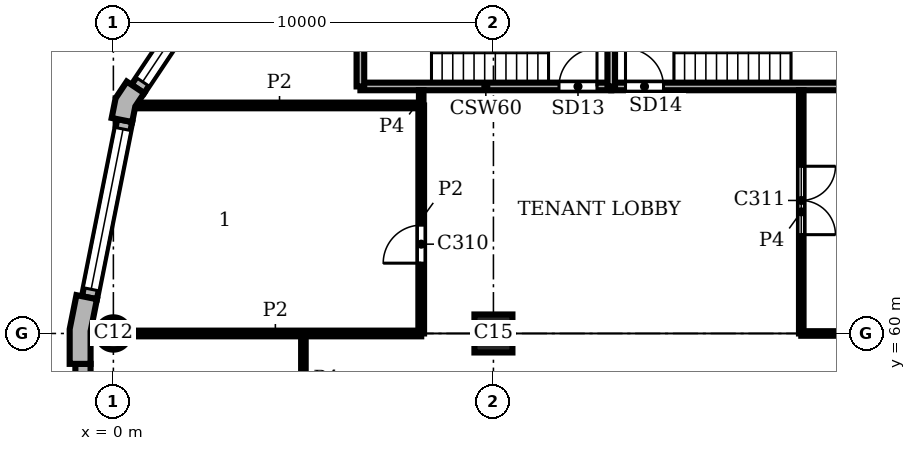
"""IFC4 building model, lengths in metres.
Left out: names, types, materials, properties, quantities, classifications, styles, units other than length and angle.
Written with IfcOpenShell. Run it as: python <this file> out.ifc"""

import sys

from ifc_helpers import new_model, si_unit, direction, frame, frame_2d, origin, origin_2d, place, context, subcontext, project, spatial, polyline, rectangle, circle, outline, extrude, element, fill, save


model = new_model("IFC4")
c1 = context("Model", 3, precision=1e-05, world=origin(), true_north=direction((0.0, 1.0)))
c2 = subcontext(c1, "Body", "Model", "MODEL_VIEW")
j1 = project(units=[si_unit("LENGTHUNIT", "METRE"), si_unit("PLANEANGLEUNIT", "RADIAN")], contexts=[c1])
p1 = place(None, origin())
s1 = spatial("IfcSite", under=j1, at=p1, CompositionType="ELEMENT")
p2 = place(p1, origin())
s2 = spatial("IfcBuilding", under=s1, at=p2, CompositionType="ELEMENT")
p3 = place(p2, frame((0.0, 0.0, 274.8)))
s3 = spatial("IfcBuildingStorey", under=s2, at=p3, CompositionType="ELEMENT", Elevation=274.8)
p4 = place(p3, frame((0.0, 60.0, 0.0), z_axis=(0.0, 0.0, 1.0), x_axis=(1.0, 0.0, 0.0)))
e1 = element("IfcColumn", 1, at=p4, inside=s3, PredefinedType="COLUMN", context=c2, shape_type="SweptSolid", body=[
    extrude(circle(Radius=0.425, at=origin_2d()), origin(), (0.0, 0.0, 1.0), 3.9),
])
p5 = place(p3, frame((10.0, 60.0, 0.0), z_axis=(0.0, 0.0, 1.0), x_axis=(1.0, 0.0, 0.0)))
e2 = element("IfcColumn", 2, at=p5, inside=s3, PredefinedType="COLUMN", context=c2, shape_type="SweptSolid", body=[
    extrude(rectangle(XDim=1.0, YDim=1.0, at=origin_2d()), origin(), (0.0, 0.0, 1.0), 3.9),
])
p6 = place(p3, origin())
e3 = element("IfcWall", 3, at=p6, inside=s3, PredefinedType="SOLIDWALL", context=c2, shape_type="SweptSolid", body=[
    extrude(outline(polyline([(0.477, 66.545), (0.352, 66.629), (0.059, 66.189), (-0.045, 65.67), (0.103, 65.641), (0.495, 65.563), (0.577, 65.974), (0.81, 66.323), (0.477, 66.545)])), origin(), (0.0, 0.0, 1.0), 3.9),
])
e4 = element("IfcWall", 4, at=p6, inside=s3, PredefinedType="SOLIDWALL", context=c2, shape_type="SweptSolid", body=[
    extrude(outline(polyline([(-0.825, 60.98), (-0.972, 61.009), (-1.15, 60.113), (-1.15, 59.2), (-1.0, 59.2), (-0.6, 59.2), (-0.6, 60.059), (-0.432, 60.902), (-0.825, 60.98)])), origin(), (0.0, 0.0, 1.0), 3.9),
])
p7 = place(p3, frame((3.284, 70.386, 0.0), z_axis=(0.0, 0.0, 1.0), x_axis=(-0.555541552266, -0.831488775454, 0.0)))
e5 = element("IfcWall", 5, at=p7, inside=s3, PredefinedType="SOLIDWALL", context=c2, shape_type="SweptSolid", body=[
    extrude(rectangle(XDim=4.753, YDim=0.4, at=frame_2d((2.376, 0.0))), origin(), (0.0, 0.0, 1.0), 3.9),
])
p8 = place(p7, frame((0.226, 0.0, 0.9)))
e6 = element("IfcOpeningElement", 6, at=p8, cuts=e5, PredefinedType="OPENING", context=c2, shape_type="SweptSolid", body=[
    extrude(rectangle(XDim=4.3, YDim=2.35, at=frame_2d((2.15, 1.175))), frame((0.0, 0.21, 0.0), z_axis=(0.0, -1.0, 0.0), x_axis=(1.0, 0.0, 0.0)), (0.0, 0.0, 1.0), 0.42),
])
p9 = place(p3, frame((0.299, 65.602, 0.0), z_axis=(0.0, 0.0, 1.0), x_axis=(-0.195098533057, -0.98078364709, 0.0)))
e7 = element("IfcWall", 7, at=p9, inside=s3, PredefinedType="SOLIDWALL", context=c2, shape_type="SweptSolid", body=[
    extrude(rectangle(XDim=4.753, YDim=0.4, at=frame_2d((2.376, 0.0))), origin(), (0.0, 0.0, 1.0), 3.9),
])
p10 = place(p9, frame((0.226, 0.0, 0.9)))
e8 = element("IfcOpeningElement", 8, at=p10, cuts=e7, PredefinedType="OPENING", context=c2, shape_type="SweptSolid", body=[
    extrude(rectangle(XDim=4.3, YDim=2.35, at=frame_2d((2.15, 1.175))), frame((0.0, 0.21, 0.0), z_axis=(0.0, -1.0, 0.0), x_axis=(1.0, 0.0, 0.0)), (0.0, 0.0, 1.0), 0.42),
])
p11 = place(p3, frame((-0.8, 59.2, 0.0), z_axis=(0.0, 0.0, 1.0), x_axis=(0.0, -1.0, 0.0)))
e9 = element("IfcWall", 9, at=p11, inside=s3, PredefinedType="SOLIDWALL", context=c2, shape_type="SweptSolid", body=[
    extrude(rectangle(XDim=18.4, YDim=0.4, at=frame_2d((9.2, 0.0))), origin(), (0.0, 0.0, 1.0), 3.9),
])
p12 = place(p11, frame((3.75, 0.0, 0.9)))
e10 = element("IfcOpeningElement", 10, at=p12, cuts=e9, PredefinedType="OPENING", context=c2, shape_type="SweptSolid", body=[
    extrude(rectangle(XDim=0.9, YDim=2.35, at=frame_2d((0.45, 1.175))), frame((0.0, 0.21, 0.0), z_axis=(0.0, -1.0, 0.0), x_axis=(1.0, 0.0, 0.0)), (0.0, 0.0, 1.0), 0.42),
])
p13 = place(p11, frame((13.75, 0.0, 0.9)))
e11 = element("IfcOpeningElement", 11, at=p13, cuts=e9, PredefinedType="OPENING", context=c2, shape_type="SweptSolid", body=[
    extrude(rectangle(XDim=0.9, YDim=2.35, at=frame_2d((0.45, 1.175))), frame((0.0, 0.21, 0.0), z_axis=(0.0, -1.0, 0.0), x_axis=(1.0, 0.0, 0.0)), (0.0, 0.0, 1.0), 0.42),
])
p14 = place(p3, frame((6.5, 66.5, 0.0), z_axis=(0.0, 0.0, 1.0), x_axis=(1.0, 0.0, 0.0)))
e12 = element("IfcWall", 12, at=p14, inside=s3, PredefinedType="SHEAR", context=c2, shape_type="SweptSolid", body=[
    extrude(rectangle(XDim=6.6, YDim=0.2, at=frame_2d((3.3, 0.0))), origin(), (0.0, 0.0, 1.0), 3.58),
])
p15 = place(p14, frame((5.225, 0.0, 0.0)))
e13 = element("IfcOpeningElement", 13, at=p15, cuts=e12, PredefinedType="OPENING", context=c2, shape_type="SweptSolid", body=[
    extrude(rectangle(XDim=1.0, YDim=2.1, at=frame_2d((0.5, 1.05))), frame((0.0, 0.11, 0.0), z_axis=(0.0, -1.0, 0.0), x_axis=(1.0, 0.0, 0.0)), (0.0, 0.0, 1.0), 0.22),
])
p16 = place(p3, frame((13.1, 66.5, 0.0), z_axis=(0.0, 0.0, 1.0), x_axis=(1.0, 0.0, 0.0)))
e14 = element("IfcWall", 14, at=p16, inside=s3, PredefinedType="SHEAR", context=c2, shape_type="SweptSolid", body=[
    extrude(rectangle(XDim=6.6, YDim=0.2, at=frame_2d((3.3, 0.0))), origin(), (0.0, 0.0, 1.0), 3.58),
])
p17 = place(p16, frame((0.375, 0.0, 0.0)))
e15 = element("IfcOpeningElement", 15, at=p17, cuts=e14, PredefinedType="OPENING", context=c2, shape_type="SweptSolid", body=[
    extrude(rectangle(XDim=1.0, YDim=2.1, at=frame_2d((0.5, 1.05))), frame((0.0, 0.11, 0.0), z_axis=(0.0, -1.0, 0.0), x_axis=(1.0, 0.0, 0.0)), (0.0, 0.0, 1.0), 0.22),
])
for number, where, z_axis, x_axis in (
    (16, (6.5, 66.5, 0.0), (0.0, 0.0, 1.0), (0.0, 1.0, 0.0)),
    (17, (13.1, 66.5, 0.0), (0.0, 0.0, 1.0), (0.0, 1.0, 0.0)),
):
    element("IfcWall", number, at=place(p3, frame(where, z_axis=z_axis, x_axis=x_axis)), inside=s3, PredefinedType="SHEAR", context=c2, shape_type="SweptSolid", body=[
        extrude(rectangle(XDim=3.3, YDim=0.2, at=frame_2d((1.65, 0.0))), origin(), (0.0, 0.0, 1.0), 3.58),
    ])
p18 = place(p3, frame((8.1, 60.0, 0.0), z_axis=(0.0, 0.0, 1.0), x_axis=(0.0, 1.0, 0.0)))
e18 = element("IfcWall", 18, at=p18, inside=s3, PredefinedType="PARTITIONING", context=c2, shape_type="SweptSolid", body=[
    extrude(rectangle(XDim=6.0, YDim=0.15, at=frame_2d((3.0, 0.0))), origin(), (0.0, 0.0, 1.0), 3.58),
])
p19 = place(p18, frame((1.85, 0.0, 0.0)))
e19 = element("IfcOpeningElement", 19, at=p19, cuts=e18, PredefinedType="OPENING", context=c2, shape_type="SweptSolid", body=[
    extrude(rectangle(XDim=1.0, YDim=2.1, at=frame_2d((0.5, 1.05))), frame((0.0, 0.085, 0.0), z_axis=(0.0, -1.0, 0.0), x_axis=(1.0, 0.0, 0.0)), (0.0, 0.0, 1.0), 0.17),
])
p20 = place(p3, frame((0.425, 60.0, 0.0), z_axis=(0.0, 0.0, 1.0), x_axis=(1.0, 0.0, 0.0)))
e20 = element("IfcWall", 20, at=p20, inside=s3, PredefinedType="PARTITIONING", context=c2, shape_type="SweptSolid", body=[
    extrude(rectangle(XDim=7.675, YDim=0.15, at=frame_2d((3.837, 0.0))), origin(), (0.0, 0.0, 1.0), 3.58),
])
p21 = place(p3, frame((0.644, 66.0, 0.0), z_axis=(0.0, 0.0, 1.0), x_axis=(1.0, 0.0, 0.0)))
e21 = element("IfcWall", 21, at=p21, inside=s3, PredefinedType="PARTITIONING", context=c2, shape_type="SweptSolid", body=[
    extrude(rectangle(XDim=7.456, YDim=0.15, at=frame_2d((3.728, 0.0))), origin(), (0.0, 0.0, 1.0), 3.58),
])
p22 = place(p3, frame((5.0, 57.6, 0.0), z_axis=(0.0, 0.0, 1.0), x_axis=(0.0, 1.0, 0.0)))
e22 = element("IfcWall", 22, at=p22, inside=s3, PredefinedType="PARTITIONING", context=c2, shape_type="SweptSolid", body=[
    extrude(rectangle(XDim=2.4, YDim=0.12, at=frame_2d((1.2, 0.0))), origin(), (0.0, 0.0, 1.0), 3.58),
])
p23 = place(p3, frame((8.1, 66.0, 0.0), z_axis=(0.0, 0.0, 1.0), x_axis=(0.0, 1.0, 0.0)))
e23 = element("IfcWall", 23, at=p23, inside=s3, PredefinedType="PARTITIONING", context=c2, shape_type="SweptSolid", body=[
    extrude(rectangle(XDim=0.4, YDim=0.12, at=frame_2d((0.2, 0.0))), origin(), (0.0, 0.0, 1.0), 3.58),
])
p24 = place(p3, frame((18.1, 60.0, 0.0), z_axis=(0.0, 0.0, 1.0), x_axis=(0.0, 1.0, 0.0)))
e24 = element("IfcWall", 24, at=p24, inside=s3, PredefinedType="PARTITIONING", context=c2, shape_type="SweptSolid", body=[
    extrude(rectangle(XDim=6.4, YDim=0.12, at=frame_2d((3.2, 0.0))), origin(), (0.0, 0.0, 1.0), 3.58),
])
p25 = place(p24, frame((2.6, 0.0, 0.0)))
e25 = element("IfcOpeningElement", 25, at=p25, cuts=e24, PredefinedType="OPENING", context=c2, shape_type="SweptSolid", body=[
    extrude(rectangle(XDim=1.8, YDim=2.1, at=frame_2d((0.9, 1.05))), frame((0.0, 0.07, 0.0), z_axis=(0.0, -1.0, 0.0), x_axis=(1.0, 0.0, 0.0)), (0.0, 0.0, 1.0), 0.14),
])
p26 = place(p3, frame((18.1, 60.0, 0.0), z_axis=(0.0, 0.0, 1.0), x_axis=(1.0, 0.0, 0.0)))
e26 = element("IfcWall", 26, at=p26, inside=s3, PredefinedType="PARTITIONING", context=c2, shape_type="SweptSolid", body=[
    extrude(rectangle(XDim=1.4, YDim=0.12, at=frame_2d((0.7, 0.0))), origin(), (0.0, 0.0, 1.0), 3.58),
])
p27 = place(p8, origin())
e27 = element("IfcWindow", 27, at=p27, inside=s3, PartitioningType="SINGLE_PANEL", PredefinedType="WINDOW", context=c2, shape_type="SweptSolid", body=[
    extrude(rectangle(XDim=4.3, YDim=2.35, at=frame_2d((2.15, 1.175))), frame((0.0, 0.16, 0.0), z_axis=(0.0, -1.0, 0.0), x_axis=(1.0, 0.0, 0.0)), (0.0, 0.0, 1.0), 0.06),
])
fill(e6, e27)
p28 = place(p10, origin())
e28 = element("IfcWindow", 28, at=p28, inside=s3, PartitioningType="SINGLE_PANEL", PredefinedType="WINDOW", context=c2, shape_type="SweptSolid", body=[
    extrude(rectangle(XDim=4.3, YDim=2.35, at=frame_2d((2.15, 1.175))), frame((0.0, 0.16, 0.0), z_axis=(0.0, -1.0, 0.0), x_axis=(1.0, 0.0, 0.0)), (0.0, 0.0, 1.0), 0.06),
])
fill(e8, e28)
p29 = place(p15, origin())
e29 = element("IfcDoor", 29, at=p29, inside=s3, OperationType="SINGLE_SWING_RIGHT", PredefinedType="DOOR", context=c2, shape_type="SweptSolid", body=[
    extrude(rectangle(XDim=1.0, YDim=2.1, at=frame_2d((0.5, 1.05))), frame((0.0, 0.025, 0.0), z_axis=(0.0, -1.0, 0.0), x_axis=(1.0, 0.0, 0.0)), (0.0, 0.0, 1.0), 0.05),
])
fill(e13, e29)
p30 = place(p17, origin())
e30 = element("IfcDoor", 30, at=p30, inside=s3, OperationType="SINGLE_SWING_LEFT", PredefinedType="DOOR", context=c2, shape_type="SweptSolid", body=[
    extrude(rectangle(XDim=1.0, YDim=2.1, at=frame_2d((0.5, 1.05))), frame((0.0, 0.025, 0.0), z_axis=(0.0, -1.0, 0.0), x_axis=(1.0, 0.0, 0.0)), (0.0, 0.0, 1.0), 0.05),
])
fill(e15, e30)
p31 = place(p19, origin())
e31 = element("IfcDoor", 31, at=p31, inside=s3, OperationType="SINGLE_SWING_LEFT", PredefinedType="DOOR", context=c2, shape_type="SweptSolid", body=[
    extrude(rectangle(XDim=1.0, YDim=2.1, at=frame_2d((0.5, 1.05))), frame((0.0, 0.025, 0.0), z_axis=(0.0, -1.0, 0.0), x_axis=(1.0, 0.0, 0.0)), (0.0, 0.0, 1.0), 0.05),
])
fill(e19, e31)
p32 = place(p25, frame((1.8, 0.0, 0.0), z_axis=(0.0, 0.0, 1.0), x_axis=(-1.0, 0.0, 0.0)))
e32 = element("IfcDoor", 32, at=p32, inside=s3, OperationType="DOUBLE_DOOR_SINGLE_SWING", PredefinedType="DOOR", context=c2, shape_type="SweptSolid", body=[
    extrude(rectangle(XDim=1.8, YDim=2.1, at=frame_2d((0.9, 1.05))), frame((0.0, 0.025, 0.0), z_axis=(0.0, -1.0, 0.0), x_axis=(1.0, 0.0, 0.0)), (0.0, 0.0, 1.0), 0.05),
])
fill(e25, e32)
save(model, sys.argv[1])
